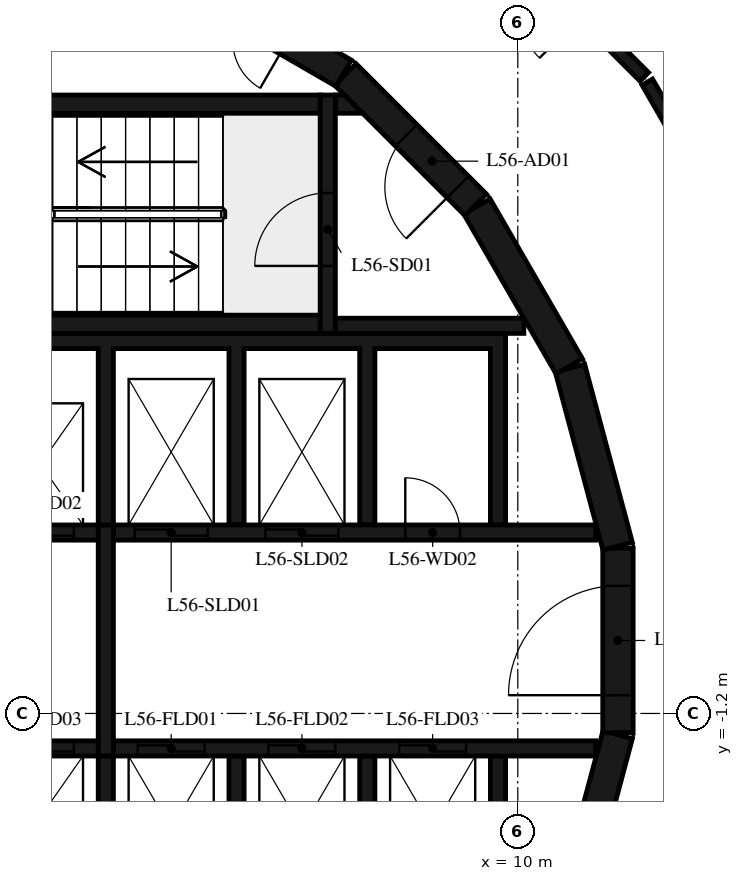
"""IFC4 building model, lengths in metres.
Left out: names, types, materials, properties, quantities, classifications, styles, units other than length and angle.
Written with IfcOpenShell. Run it as: python <this file> out.ifc"""

import sys

from ifc_helpers import new_model, si_unit, direction, frame, frame_2d, origin, place, context, subcontext, project, spatial, polyline, rectangle, outline, extrude, element, fill, save


model = new_model("IFC4")
c1 = context("Model", 3, precision=1e-05, world=origin(), true_north=direction((0.0, 1.0)))
c2 = subcontext(c1, "Body", "Model", "MODEL_VIEW")
j1 = project(units=[si_unit("LENGTHUNIT", "METRE"), si_unit("PLANEANGLEUNIT", "RADIAN")], contexts=[c1])
p1 = place(None, origin())
s1 = spatial("IfcSite", under=j1, at=p1, CompositionType="ELEMENT")
p2 = place(p1, origin())
s2 = spatial("IfcBuilding", under=s1, at=p2, CompositionType="ELEMENT")
p3 = place(p2, frame((0.0, 0.0, 219.9)))
s3 = spatial("IfcBuildingStorey", under=s2, at=p3, CompositionType="ELEMENT", Elevation=219.9)
p4 = place(p3, frame((10.858, -4.479, 0.0), z_axis=(0.0, 0.0, 1.0), x_axis=(0.258734743916, 0.965948410781, 0.0)))
e1 = element("IfcWall", 1, at=p4, inside=s3, PredefinedType="SHEAR", context=c2, shape_type="SweptSolid", body=[
    extrude(rectangle(XDim=3.033, YDim=0.5, at=frame_2d((1.516, 0.0))), origin(), (0.0, 0.0, 1.0), 6.35),
])
p5 = place(p3, frame((11.647, -1.516, 0.0), z_axis=(0.0, 0.0, 1.0), x_axis=(0.0, 1.0, 0.0)))
e2 = element("IfcWall", 2, at=p5, inside=s3, PredefinedType="SHEAR", context=c2, shape_type="SweptSolid", body=[
    extrude(rectangle(XDim=3.033, YDim=0.5, at=frame_2d((1.516, 0.0))), origin(), (0.0, 0.0, 1.0), 6.35),
])
p6 = place(p5, frame((0.616, 0.0, 0.0)))
e3 = element("IfcOpeningElement", 3, at=p6, cuts=e2, PredefinedType="OPENING", context=c2, shape_type="SweptSolid", body=[
    extrude(rectangle(XDim=1.8, YDim=2.1, at=frame_2d((0.9, 1.05))), frame((0.0, 0.26, 0.0), z_axis=(0.0, -1.0, 0.0), x_axis=(1.0, 0.0, 0.0)), (0.0, 0.0, 1.0), 0.52),
])
for number, where, z_axis, x_axis in (
    (4, (11.643, 1.55, 0.0), (0.0, 0.0, 1.0), (-0.259, 0.966, 0.0)),
    (5, (10.845, 4.51, 0.0), (0.0, 0.0, 1.0), (-0.5, 0.866, 0.0)),
):
    element("IfcWall", number, at=place(p3, frame(where, z_axis=z_axis, x_axis=x_axis)), inside=s3, PredefinedType="SHEAR", context=c2, shape_type="SweptSolid", body=[
        extrude(rectangle(XDim=3.033, YDim=0.5, at=frame_2d((1.516, 0.0))), origin(), (0.0, 0.0, 1.0), 6.35),
    ])
p7 = place(p3, frame((9.308, 7.164, 0.0), z_axis=(0.0, 0.0, 1.0), x_axis=(-0.707106781187, 0.707106781187, 0.0)))
e6 = element("IfcWall", 6, at=p7, inside=s3, PredefinedType="SHEAR", context=c2, shape_type="SweptSolid", body=[
    extrude(rectangle(XDim=3.032, YDim=0.5, at=frame_2d((1.516, 0.0))), origin(), (0.0, 0.0, 1.0), 6.35),
])
p8 = place(p7, frame((0.416, 0.0, 0.0)))
e7 = element("IfcOpeningElement", 7, at=p8, cuts=e6, PredefinedType="OPENING", context=c2, shape_type="SweptSolid", body=[
    extrude(rectangle(XDim=1.2, YDim=2.1, at=frame_2d((0.6, 1.05))), frame((0.0, 0.26, 0.0), z_axis=(0.0, -1.0, 0.0), x_axis=(1.0, 0.0, 0.0)), (0.0, 0.0, 1.0), 0.52),
])
p9 = place(p3, frame((7.137, 9.329, 0.0), z_axis=(0.0, 0.0, 1.0), x_axis=(-0.865975092491, 0.500087131594, 0.0)))
e8 = element("IfcWall", 8, at=p9, inside=s3, PredefinedType="SHEAR", context=c2, shape_type="SweptSolid", body=[
    extrude(rectangle(XDim=3.033, YDim=0.5, at=frame_2d((1.516, 0.0))), origin(), (0.0, 0.0, 1.0), 6.35),
])
p10 = place(p9, frame((1.066, 0.0, 0.0)))
e9 = element("IfcOpeningElement", 9, at=p10, cuts=e8, PredefinedType="OPENING", context=c2, shape_type="SweptSolid", body=[
    extrude(rectangle(XDim=0.9, YDim=2.1, at=frame_2d((0.45, 1.05))), frame((0.0, 0.26, 0.0), z_axis=(0.0, -1.0, 0.0), x_axis=(1.0, 0.0, 0.0)), (0.0, 0.0, 1.0), 0.52),
])
for number, where, z_axis, x_axis in (
    (10, (0.0, 5.2, 0.0), (0.0, 0.0, 1.0), (1.0, 0.0, 0.0)),
    (11, (0.0, 8.82, 0.0), (0.0, 0.0, 1.0), (1.0, 0.0, 0.0)),
):
    element("IfcWall", number, at=place(p3, frame(where, z_axis=z_axis, x_axis=x_axis)), inside=s3, PredefinedType="SHEAR", context=c2, shape_type="SweptSolid", body=[
        extrude(rectangle(XDim=6.75, YDim=0.3, at=frame_2d((3.375, 0.0))), origin(), (0.0, 0.0, 1.0), 6.35),
    ])
p11 = place(p3, frame((6.875, 5.05, 0.0), z_axis=(0.0, 0.0, 1.0), x_axis=(0.0, 1.0, 0.0)))
e12 = element("IfcWall", 12, at=p11, inside=s3, PredefinedType="SHEAR", context=c2, shape_type="SweptSolid", body=[
    extrude(rectangle(XDim=3.92, YDim=0.25, at=frame_2d((1.96, 0.0))), origin(), (0.0, 0.0, 1.0), 6.35),
])
p12 = place(p11, frame((1.11, 0.0, 0.0)))
e13 = element("IfcOpeningElement", 13, at=p12, cuts=e12, PredefinedType="OPENING", context=c2, shape_type="SweptSolid", body=[
    extrude(rectangle(XDim=1.2, YDim=2.1, at=frame_2d((0.6, 1.05))), frame((0.0, 0.135, 0.0), z_axis=(0.0, -1.0, 0.0), x_axis=(1.0, 0.0, 0.0)), (0.0, 0.0, 1.0), 0.27),
])
p13 = place(p3, frame((7.0, 5.175, 0.0), z_axis=(0.0, 0.0, 1.0), x_axis=(1.0, 0.0, 0.0)))
e14 = element("IfcWall", 14, at=p13, inside=s3, PredefinedType="SHEAR", context=c2, shape_type="SweptSolid", body=[
    extrude(rectangle(XDim=3.1, YDim=0.25, at=frame_2d((1.55, 0.0))), origin(), (0.0, 0.0, 1.0), 6.35),
])
p14 = place(p3, origin())
e15 = element("IfcWall", 15, at=p14, inside=s3, PredefinedType="SHEAR", context=c2, shape_type="SweptSolid", body=[
    extrude(outline(polyline([(7.448, 8.67), (7.0, 8.67), (7.0, 8.97), (7.148, 8.97), (7.448, 8.67)])), origin(), (0.0, 0.0, 1.0), 6.35),
])
p15 = place(p3, origin())
e16 = element("IfcWall", 16, at=p15, inside=s3, PredefinedType="SHEAR", context=c2, shape_type="SweptSolid", body=[
    extrude(outline(polyline([(-9.55, 4.8), (-1.2, 4.8), (-1.2, 1.9), (-0.95, 1.9), (-0.95, 4.8), (0.95, 4.8), (0.95, 1.9), (1.2, 1.9), (1.2, 4.8), (3.1, 4.8), (3.1, 1.9), (3.35, 1.9), (3.35, 4.8), (5.25, 4.8), (5.25, 1.9), (5.5, 1.9), (5.5, 4.8), (7.4, 4.8), (7.4, 1.9), (7.65, 1.9), (7.65, 4.8), (9.55, 4.8), (9.55, 1.9), (9.8, 1.9), (9.8, 4.8), (9.8, 5.05), (-9.8, 5.05), (-9.8, 4.8), (-9.8, 1.9), (-9.55, 1.9), (-9.55, 4.8)])), origin(), (0.0, 0.0, 1.0), 6.35),
])
p16 = place(p3, origin())
e17 = element("IfcWall", 17, at=p16, inside=s3, PredefinedType="SHEAR", context=c2, shape_type="SweptSolid", body=[
    extrude(outline(polyline([(9.8, -5.05), (9.8, -4.8), (9.8, -1.9), (9.55, -1.9), (9.55, -4.8), (7.65, -4.8), (7.65, -1.9), (7.4, -1.9), (7.4, -4.8), (5.5, -4.8), (5.5, -1.9), (5.25, -1.9), (5.25, -4.8), (3.35, -4.8), (3.35, -1.9), (3.1, -1.9), (3.1, -4.8), (1.2, -4.8), (1.2, -1.9), (0.95, -1.9), (0.95, -4.8), (-5.25, -4.8), (-5.25, -1.9), (-5.5, -1.9), (-5.5, -4.8), (-7.4, -4.8), (-7.4, -1.9), (-7.65, -1.9), (-7.65, -4.8), (-9.55, -4.8), (-9.55, -1.9), (-9.8, -1.9), (-9.8, -4.8), (-9.8, -5.05), (9.8, -5.05)])), origin(), (0.0, 0.0, 1.0), 6.35),
])
p17 = place(p3, frame((-11.28, 1.775, 0.0), z_axis=(0.0, 0.0, 1.0), x_axis=(1.0, 0.0, 0.0)))
e18 = element("IfcWall", 18, at=p17, inside=s3, PredefinedType="SHEAR", context=c2, shape_type="SweptSolid", body=[
    extrude(rectangle(XDim=14.38, YDim=0.25, at=frame_2d((7.19, 0.0))), origin(), (0.0, 0.0, 1.0), 6.35),
])
p18 = place(p17, frame((10.73, 0.0, 0.0)))
e19 = element("IfcOpeningElement", 19, at=p18, cuts=e18, PredefinedType="OPENING", context=c2, shape_type="SweptSolid", body=[
    extrude(rectangle(XDim=1.1, YDim=2.1, at=frame_2d((0.55, 1.05))), frame((0.0, 0.135, 0.0), z_axis=(0.0, -1.0, 0.0), x_axis=(1.0, 0.0, 0.0)), (0.0, 0.0, 1.0), 0.27),
])
p19 = place(p17, frame((12.88, 0.0, 0.0)))
e20 = element("IfcOpeningElement", 20, at=p19, cuts=e18, PredefinedType="OPENING", context=c2, shape_type="SweptSolid", body=[
    extrude(rectangle(XDim=1.1, YDim=2.1, at=frame_2d((0.55, 1.05))), frame((0.0, 0.135, 0.0), z_axis=(0.0, -1.0, 0.0), x_axis=(1.0, 0.0, 0.0)), (0.0, 0.0, 1.0), 0.27),
])
p20 = place(p17, frame((5.455, 0.0, 0.0)))
e21 = element("IfcOpeningElement", 21, at=p20, cuts=e18, PredefinedType="OPENING", context=c2, shape_type="SweptSolid", body=[
    extrude(rectangle(XDim=0.9, YDim=2.1, at=frame_2d((0.45, 1.05))), frame((0.0, 0.135, 0.0), z_axis=(0.0, -1.0, 0.0), x_axis=(1.0, 0.0, 0.0)), (0.0, 0.0, 1.0), 0.27),
])
p21 = place(p3, frame((3.35, 1.775, 0.0), z_axis=(0.0, 0.0, 1.0), x_axis=(1.0, 0.0, 0.0)))
e22 = element("IfcWall", 22, at=p21, inside=s3, PredefinedType="SHEAR", context=c2, shape_type="SweptSolid", body=[
    extrude(rectangle(XDim=7.93, YDim=0.25, at=frame_2d((3.965, 0.0))), origin(), (0.0, 0.0, 1.0), 6.35),
])
p22 = place(p21, frame((0.35, 0.0, 0.0)))
e23 = element("IfcOpeningElement", 23, at=p22, cuts=e22, PredefinedType="OPENING", context=c2, shape_type="SweptSolid", body=[
    extrude(rectangle(XDim=1.2, YDim=2.4, at=frame_2d((0.6, 1.2))), frame((0.0, 0.135, 0.0), z_axis=(0.0, -1.0, 0.0), x_axis=(1.0, 0.0, 0.0)), (0.0, 0.0, 1.0), 0.27),
])
p23 = place(p21, frame((2.5, 0.0, 0.0)))
e24 = element("IfcOpeningElement", 24, at=p23, cuts=e22, PredefinedType="OPENING", context=c2, shape_type="SweptSolid", body=[
    extrude(rectangle(XDim=1.2, YDim=2.4, at=frame_2d((0.6, 1.2))), frame((0.0, 0.135, 0.0), z_axis=(0.0, -1.0, 0.0), x_axis=(1.0, 0.0, 0.0)), (0.0, 0.0, 1.0), 0.27),
])
p24 = place(p21, frame((4.8, 0.0, 0.0)))
e25 = element("IfcOpeningElement", 25, at=p24, cuts=e22, PredefinedType="OPENING", context=c2, shape_type="SweptSolid", body=[
    extrude(rectangle(XDim=0.9, YDim=2.1, at=frame_2d((0.45, 1.05))), frame((0.0, 0.135, 0.0), z_axis=(0.0, -1.0, 0.0), x_axis=(1.0, 0.0, 0.0)), (0.0, 0.0, 1.0), 0.27),
])
p25 = place(p3, frame((-11.28, -1.775, 0.0), z_axis=(0.0, 0.0, 1.0), x_axis=(1.0, 0.0, 0.0)))
e26 = element("IfcWall", 26, at=p25, inside=s3, PredefinedType="SHEAR", context=c2, shape_type="SweptSolid", body=[
    extrude(rectangle(XDim=14.38, YDim=0.25, at=frame_2d((7.19, 0.0))), origin(), (0.0, 0.0, 1.0), 6.35),
])
p26 = place(p25, frame((12.88, 0.0, 0.0)))
e27 = element("IfcOpeningElement", 27, at=p26, cuts=e26, PredefinedType="OPENING", context=c2, shape_type="SweptSolid", body=[
    extrude(rectangle(XDim=1.1, YDim=2.1, at=frame_2d((0.55, 1.05))), frame((0.0, 0.135, 0.0), z_axis=(0.0, -1.0, 0.0), x_axis=(1.0, 0.0, 0.0)), (0.0, 0.0, 1.0), 0.27),
])
p27 = place(p25, frame((8.68, 0.0, 0.0)))
e28 = element("IfcOpeningElement", 28, at=p27, cuts=e26, PredefinedType="OPENING", context=c2, shape_type="SweptSolid", body=[
    extrude(rectangle(XDim=0.9, YDim=2.1, at=frame_2d((0.45, 1.05))), frame((0.0, 0.135, 0.0), z_axis=(0.0, -1.0, 0.0), x_axis=(1.0, 0.0, 0.0)), (0.0, 0.0, 1.0), 0.27),
])
p28 = place(p3, frame((3.35, -1.775, 0.0), z_axis=(0.0, 0.0, 1.0), x_axis=(1.0, 0.0, 0.0)))
e29 = element("IfcWall", 29, at=p28, inside=s3, PredefinedType="SHEAR", context=c2, shape_type="SweptSolid", body=[
    extrude(rectangle(XDim=7.93, YDim=0.25, at=frame_2d((3.965, 0.0))), origin(), (0.0, 0.0, 1.0), 6.35),
])
p29 = place(p28, frame((0.4, 0.0, 0.0)))
e30 = element("IfcOpeningElement", 30, at=p29, cuts=e29, PredefinedType="OPENING", context=c2, shape_type="SweptSolid", body=[
    extrude(rectangle(XDim=1.1, YDim=2.4, at=frame_2d((0.55, 1.2))), frame((0.0, 0.135, 0.0), z_axis=(0.0, -1.0, 0.0), x_axis=(1.0, 0.0, 0.0)), (0.0, 0.0, 1.0), 0.27),
])
p30 = place(p28, frame((2.55, 0.0, 0.0)))
e31 = element("IfcOpeningElement", 31, at=p30, cuts=e29, PredefinedType="OPENING", context=c2, shape_type="SweptSolid", body=[
    extrude(rectangle(XDim=1.1, YDim=2.4, at=frame_2d((0.55, 1.2))), frame((0.0, 0.135, 0.0), z_axis=(0.0, -1.0, 0.0), x_axis=(1.0, 0.0, 0.0)), (0.0, 0.0, 1.0), 0.27),
])
p31 = place(p28, frame((4.7, 0.0, 0.0)))
e32 = element("IfcOpeningElement", 32, at=p31, cuts=e29, PredefinedType="OPENING", context=c2, shape_type="SweptSolid", body=[
    extrude(rectangle(XDim=1.1, YDim=2.4, at=frame_2d((0.55, 1.2))), frame((0.0, 0.135, 0.0), z_axis=(0.0, -1.0, 0.0), x_axis=(1.0, 0.0, 0.0)), (0.0, 0.0, 1.0), 0.27),
])
p32 = place(p3, frame((3.225, -1.9, 0.0), z_axis=(0.0, 0.0, 1.0), x_axis=(0.0, 1.0, 0.0)))
e33 = element("IfcWall", 33, at=p32, inside=s3, PredefinedType="SHEAR", context=c2, shape_type="SweptSolid", body=[
    extrude(rectangle(XDim=3.8, YDim=0.25, at=frame_2d((1.9, 0.0))), origin(), (0.0, 0.0, 1.0), 6.35),
])
p33 = place(p3, frame((12.08, 9.27, 0.0), z_axis=(0.0, 0.0, 1.0), x_axis=(-0.707106781187, 0.707106781187, 0.0)))
e34 = element("IfcWall", 34, at=p33, inside=s3, PredefinedType="PARTITIONING", context=c2, shape_type="SweptSolid", body=[
    extrude(rectangle(XDim=3.874, YDim=0.2, at=frame_2d((1.937, 0.0))), origin(), (0.0, 0.0, 1.0), 6.35),
])
p34 = place(p33, frame((1.437, 0.0, 0.0)))
e35 = element("IfcOpeningElement", 35, at=p34, cuts=e34, PredefinedType="OPENING", context=c2, shape_type="SweptSolid", body=[
    extrude(rectangle(XDim=1.0, YDim=2.1, at=frame_2d((0.5, 1.05))), frame((0.0, 0.11, 0.0), z_axis=(0.0, -1.0, 0.0), x_axis=(1.0, 0.0, 0.0)), (0.0, 0.0, 1.0), 0.22),
])
p35 = place(p3, frame((13.458, 6.88, 0.0), z_axis=(0.0, 0.0, 1.0), x_axis=(-0.499635021678, 0.866236021597, 0.0)))
e36 = element("IfcWall", 36, at=p35, inside=s3, PredefinedType="PARTITIONING", context=c2, shape_type="SweptSolid", body=[
    extrude(rectangle(XDim=2.659, YDim=0.2, at=frame_2d((1.33, 0.0))), origin(), (0.0, 0.0, 1.0), 6.35),
])
p36 = place(p12, origin())
e37 = element("IfcDoor", 37, at=p36, inside=s3, OperationType="SINGLE_SWING_LEFT", PredefinedType="DOOR", context=c2, shape_type="SweptSolid", body=[
    extrude(rectangle(XDim=1.2, YDim=2.1, at=frame_2d((0.6, 1.05))), frame((0.0, 0.025, 0.0), z_axis=(0.0, -1.0, 0.0), x_axis=(1.0, 0.0, 0.0)), (0.0, 0.0, 1.0), 0.05),
])
fill(e13, e37)
p37 = place(p8, origin())
e38 = element("IfcDoor", 38, at=p37, inside=s3, OperationType="SINGLE_SWING_RIGHT", PredefinedType="DOOR", context=c2, shape_type="SweptSolid", body=[
    extrude(rectangle(XDim=1.2, YDim=2.1, at=frame_2d((0.6, 1.05))), frame((0.0, 0.025, 0.0), z_axis=(0.0, -1.0, 0.0), x_axis=(1.0, 0.0, 0.0)), (0.0, 0.0, 1.0), 0.05),
])
fill(e7, e38)
p38 = place(p6, origin())
e39 = element("IfcDoor", 39, at=p38, inside=s3, OperationType="DOUBLE_DOOR_SINGLE_SWING", PredefinedType="DOOR", context=c2, shape_type="SweptSolid", body=[
    extrude(rectangle(XDim=1.8, YDim=2.1, at=frame_2d((0.9, 1.05))), frame((0.0, 0.025, 0.0), z_axis=(0.0, -1.0, 0.0), x_axis=(1.0, 0.0, 0.0)), (0.0, 0.0, 1.0), 0.05),
])
fill(e3, e39)
p39 = place(p19, origin())
e40 = element("IfcDoor", 40, at=p39, inside=s3, OperationType="DOUBLE_DOOR_SLIDING", PredefinedType="DOOR", context=c2, shape_type="SweptSolid", body=[
    extrude(rectangle(XDim=1.1, YDim=2.1, at=frame_2d((0.55, 1.05))), frame((0.0, 0.025, 0.0), z_axis=(0.0, -1.0, 0.0), x_axis=(1.0, 0.0, 0.0)), (0.0, 0.0, 1.0), 0.05),
])
fill(e20, e40)
p40 = place(p22, origin())
e41 = element("IfcDoor", 41, at=p40, inside=s3, OperationType="DOUBLE_DOOR_SLIDING", PredefinedType="DOOR", context=c2, shape_type="SweptSolid", body=[
    extrude(rectangle(XDim=1.2, YDim=2.4, at=frame_2d((0.6, 1.2))), frame((0.0, 0.025, 0.0), z_axis=(0.0, -1.0, 0.0), x_axis=(1.0, 0.0, 0.0)), (0.0, 0.0, 1.0), 0.05),
])
fill(e23, e41)
p41 = place(p23, origin())
e42 = element("IfcDoor", 42, at=p41, inside=s3, OperationType="DOUBLE_DOOR_SLIDING", PredefinedType="DOOR", context=c2, shape_type="SweptSolid", body=[
    extrude(rectangle(XDim=1.2, YDim=2.4, at=frame_2d((0.6, 1.2))), frame((0.0, 0.025, 0.0), z_axis=(0.0, -1.0, 0.0), x_axis=(1.0, 0.0, 0.0)), (0.0, 0.0, 1.0), 0.05),
])
fill(e24, e42)
p42 = place(p26, origin())
e43 = element("IfcDoor", 43, at=p42, inside=s3, OperationType="DOUBLE_DOOR_SLIDING", PredefinedType="DOOR", context=c2, shape_type="SweptSolid", body=[
    extrude(rectangle(XDim=1.1, YDim=2.1, at=frame_2d((0.55, 1.05))), frame((0.0, 0.025, 0.0), z_axis=(0.0, -1.0, 0.0), x_axis=(1.0, 0.0, 0.0)), (0.0, 0.0, 1.0), 0.05),
])
fill(e27, e43)
p43 = place(p29, origin())
e44 = element("IfcDoor", 44, at=p43, inside=s3, OperationType="DOUBLE_DOOR_SLIDING", PredefinedType="DOOR", context=c2, shape_type="SweptSolid", body=[
    extrude(rectangle(XDim=1.1, YDim=2.4, at=frame_2d((0.55, 1.2))), frame((0.0, 0.025, 0.0), z_axis=(0.0, -1.0, 0.0), x_axis=(1.0, 0.0, 0.0)), (0.0, 0.0, 1.0), 0.05),
])
fill(e30, e44)
p44 = place(p30, origin())
e45 = element("IfcDoor", 45, at=p44, inside=s3, OperationType="DOUBLE_DOOR_SLIDING", PredefinedType="DOOR", context=c2, shape_type="SweptSolid", body=[
    extrude(rectangle(XDim=1.1, YDim=2.4, at=frame_2d((0.55, 1.2))), frame((0.0, 0.025, 0.0), z_axis=(0.0, -1.0, 0.0), x_axis=(1.0, 0.0, 0.0)), (0.0, 0.0, 1.0), 0.05),
])
fill(e31, e45)
p45 = place(p31, origin())
e46 = element("IfcDoor", 46, at=p45, inside=s3, OperationType="DOUBLE_DOOR_SLIDING", PredefinedType="DOOR", context=c2, shape_type="SweptSolid", body=[
    extrude(rectangle(XDim=1.1, YDim=2.4, at=frame_2d((0.55, 1.2))), frame((0.0, 0.025, 0.0), z_axis=(0.0, -1.0, 0.0), x_axis=(1.0, 0.0, 0.0)), (0.0, 0.0, 1.0), 0.05),
])
fill(e32, e46)
p46 = place(p24, origin())
e47 = element("IfcDoor", 47, at=p46, inside=s3, OperationType="SINGLE_SWING_RIGHT", PredefinedType="DOOR", context=c2, shape_type="SweptSolid", body=[
    extrude(rectangle(XDim=0.9, YDim=2.1, at=frame_2d((0.45, 1.05))), frame((0.0, 0.025, 0.0), z_axis=(0.0, -1.0, 0.0), x_axis=(1.0, 0.0, 0.0)), (0.0, 0.0, 1.0), 0.05),
])
fill(e25, e47)
save(model, sys.argv[1])
